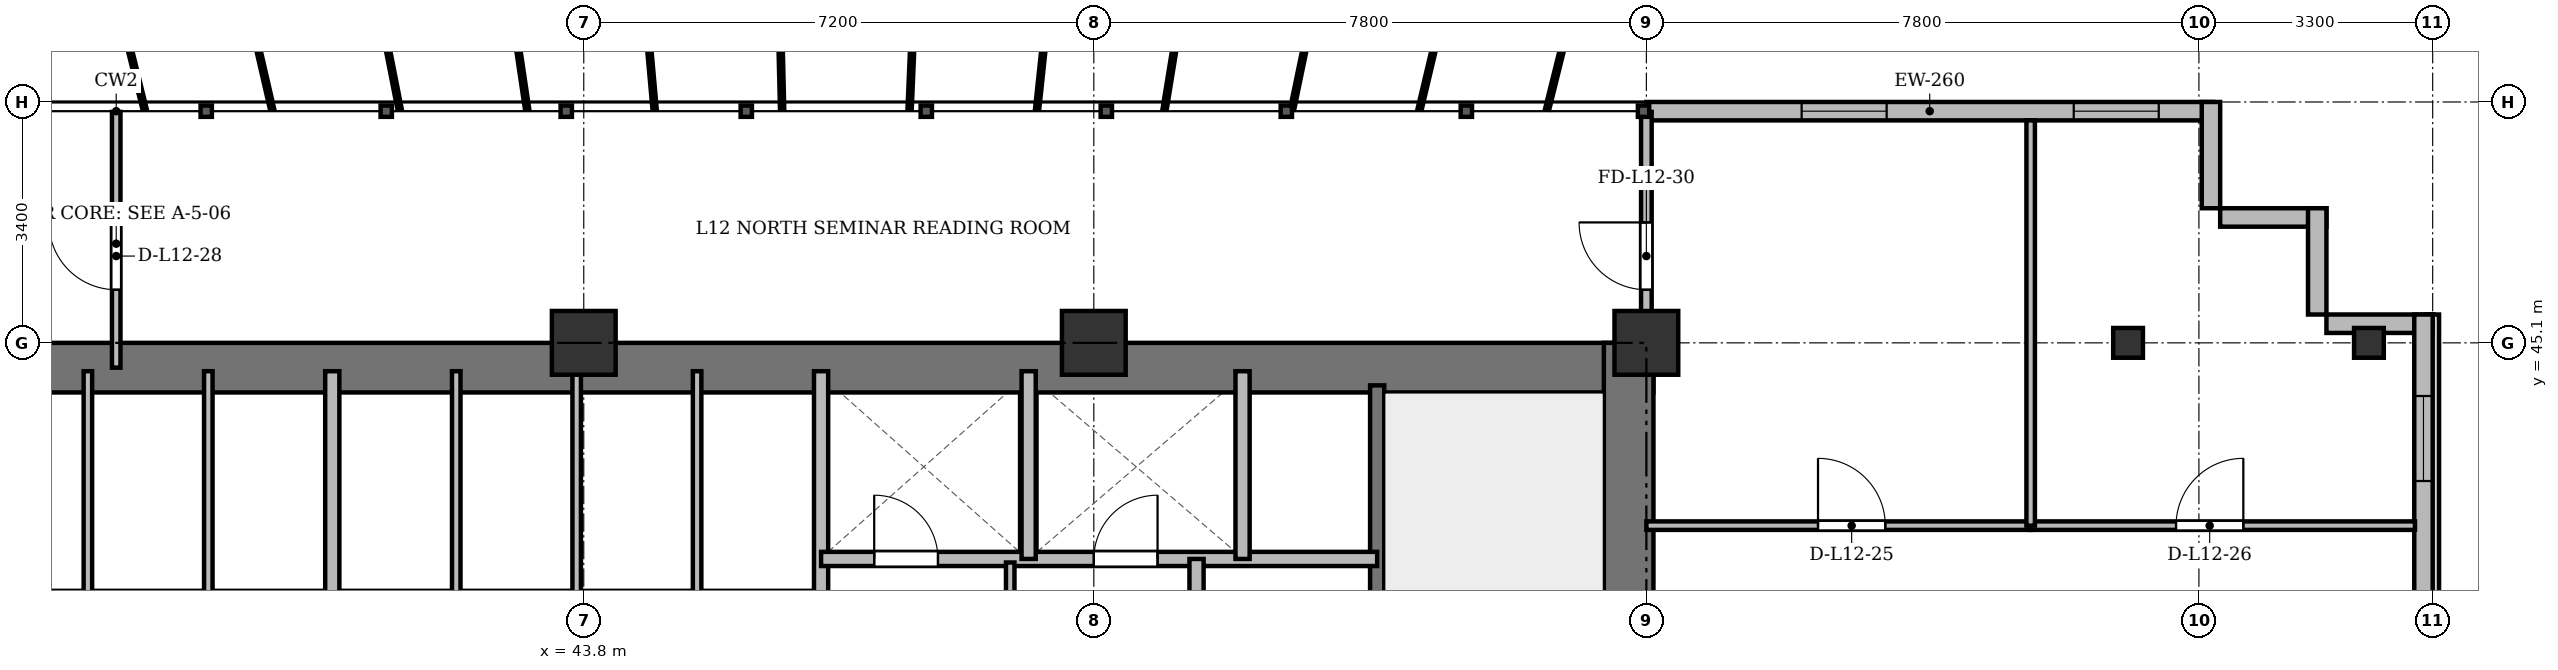
"""IFC4 building model, lengths in metres.
Left out: names, types, materials, properties, quantities, classifications, styles, units other than length and angle.
Written with IfcOpenShell. Run it as: python <this file> out.ifc"""

import sys

from ifc_helpers import new_model, si_unit, direction, frame, frame_2d, origin, origin_2d, place, context, subcontext, project, spatial, rectangle, i_section, extrude, source, transform, mapped, element, fill, save


model = new_model("IFC4")
c1 = context("Model", 3, precision=1e-05, world=origin(), true_north=direction((0.0, 1.0)))
c2 = subcontext(c1, "Body", "Model", "MODEL_VIEW")
j1 = project(units=[si_unit("LENGTHUNIT", "METRE"), si_unit("PLANEANGLEUNIT", "RADIAN")], contexts=[c1])
p1 = place(None, origin())
s1 = spatial("IfcSite", under=j1, at=p1, CompositionType="ELEMENT")
p2 = place(p1, origin())
s2 = spatial("IfcBuilding", under=s1, at=p2, CompositionType="ELEMENT")
p3 = place(p2, frame((0.0, 0.0, 48.7)))
s3 = spatial("IfcBuildingStorey", under=s2, at=p3, CompositionType="ELEMENT", Elevation=48.7)
m1 = source(origin(), c2, "Body", "SweptSolid", [
    extrude(rectangle(XDim=0.9, YDim=0.9, at=origin_2d()), origin(), (0.0, 0.0, 1.0), 3.6),
])
for number, where, z_axis, x_axis in (
    (1, (43.8, 45.1, 0.0), (0.0, 0.0, 1.0), (1.0, 0.0, 0.0)),
    (2, (51.0, 45.1, 0.0), (0.0, 0.0, 1.0), (1.0, 0.0, 0.0)),
    (3, (58.8, 45.1, 0.0), (0.0, 0.0, 1.0), (1.0, 0.0, 0.0)),
):
    element("IfcColumn", number, at=place(p3, frame(where, z_axis=z_axis, x_axis=x_axis)), inside=s3, PredefinedType="COLUMN", context=c2, shape_type="MappedRepresentation", body=[
        mapped(m1, transform((0.0, 0.0, 0.0), x_axis=(1.0, 0.0, 0.0), y_axis=(0.0, 1.0, 0.0), z_axis=(0.0, 0.0, 1.0), scale=1.0)),
    ])
m2 = source(origin(), c2, "Body", "SweptSolid", [
    extrude(i_section(OverallWidth=0.42, OverallDepth=0.42, WebThickness=0.026, FlangeThickness=0.04, at=origin_2d()), origin(), (0.0, 0.0, 1.0), 3.6),
])
for number, where, z_axis, x_axis in (
    (4, (65.6, 45.1, 0.0), (0.0, 0.0, 1.0), (1.0, 0.0, 0.0)),
    (5, (69.0, 45.1, 0.0), (0.0, 0.0, 1.0), (1.0, 0.0, 0.0)),
):
    element("IfcColumn", number, at=place(p3, frame(where, z_axis=z_axis, x_axis=x_axis)), inside=s3, PredefinedType="COLUMN", context=c2, shape_type="MappedRepresentation", body=[
        mapped(m2, transform((0.0, 0.0, 0.0), x_axis=(1.0, 0.0, 0.0), y_axis=(0.0, 1.0, 0.0), z_axis=(0.0, 0.0, 1.0), scale=1.0)),
    ])
p4 = place(p3, frame((58.8, 48.37, 0.0), z_axis=(0.0, 0.0, 1.0), x_axis=(1.0, 0.0, 0.0)))
e6 = element("IfcWall", 6, at=p4, inside=s3, PredefinedType="SOLIDWALL", context=c2, shape_type="SweptSolid", body=[
    extrude(rectangle(XDim=8.0, YDim=0.26, at=frame_2d((4.0, 0.0))), origin(), (0.0, 0.0, 1.0), 3.34),
])
p5 = place(p4, frame((2.192, 0.0, 0.9)))
e7 = element("IfcOpeningElement", 7, at=p5, cuts=e6, PredefinedType="OPENING", context=c2, shape_type="SweptSolid", body=[
    extrude(rectangle(XDim=1.2, YDim=1.65, at=frame_2d((0.6, 0.825))), frame((0.0, 0.14, 0.0), z_axis=(0.0, -1.0, 0.0), x_axis=(1.0, 0.0, 0.0)), (0.0, 0.0, 1.0), 0.28),
])
p6 = place(p4, frame((6.033, 0.0, 0.9)))
e8 = element("IfcOpeningElement", 8, at=p6, cuts=e6, PredefinedType="OPENING", context=c2, shape_type="SweptSolid", body=[
    extrude(rectangle(XDim=1.2, YDim=1.65, at=frame_2d((0.6, 0.825))), frame((0.0, 0.14, 0.0), z_axis=(0.0, -1.0, 0.0), x_axis=(1.0, 0.0, 0.0)), (0.0, 0.0, 1.0), 0.28),
])
for number, where, z_axis, x_axis in (
    (9, (66.77, 48.5, 0.0), (0.0, 0.0, 1.0), (0.0, -1.0, 0.0)),
    (10, (66.9, 46.87, 0.0), (0.0, 0.0, 1.0), (1.0, 0.0, 0.0)),
    (11, (68.27, 47.0, 0.0), (0.0, 0.0, 1.0), (0.0, -1.0, 0.0)),
):
    element("IfcWall", number, at=place(p3, frame(where, z_axis=z_axis, x_axis=x_axis)), inside=s3, PredefinedType="SOLIDWALL", context=c2, shape_type="SweptSolid", body=[
        extrude(rectangle(XDim=1.5, YDim=0.26, at=frame_2d((0.75, 0.0))), origin(), (0.0, 0.0, 1.0), 3.34),
    ])
p7 = place(p3, frame((68.4, 45.37, 0.0), z_axis=(0.0, 0.0, 1.0), x_axis=(1.0, 0.0, 0.0)))
e12 = element("IfcWall", 12, at=p7, inside=s3, PredefinedType="SOLIDWALL", context=c2, shape_type="SweptSolid", body=[
    extrude(rectangle(XDim=1.5, YDim=0.26, at=frame_2d((0.75, 0.0))), origin(), (0.0, 0.0, 1.0), 2.69),
])
p8 = place(p3, frame((69.77, 45.5, 0.0), z_axis=(0.0, 0.0, 1.0), x_axis=(0.0, -1.0, 0.0)))
e13 = element("IfcWall", 13, at=p8, inside=s3, PredefinedType="SOLIDWALL", context=c2, shape_type="SweptSolid", body=[
    extrude(rectangle(XDim=39.6, YDim=0.26, at=frame_2d((19.8, 0.0))), origin(), (0.0, 0.0, 1.0), 3.34),
])
p9 = place(p8, frame((36.95, 0.0, 0.92)))
e14 = element("IfcOpeningElement", 14, at=p9, cuts=e13, PredefinedType="OPENING", context=c2, shape_type="SweptSolid", body=[
    extrude(rectangle(XDim=1.2, YDim=1.65, at=frame_2d((0.6, 0.825))), frame((0.0, 0.14, 0.0), z_axis=(0.0, -1.0, 0.0), x_axis=(1.0, 0.0, 0.0)), (0.0, 0.0, 1.0), 0.28),
])
p10 = place(p8, frame((32.8, 0.0, 0.92)))
e15 = element("IfcOpeningElement", 15, at=p10, cuts=e13, PredefinedType="OPENING", context=c2, shape_type="SweptSolid", body=[
    extrude(rectangle(XDim=2.6, YDim=1.9, at=frame_2d((1.3, 0.95))), frame((0.0, 0.14, 0.0), z_axis=(0.0, -1.0, 0.0), x_axis=(1.0, 0.0, 0.0)), (0.0, 0.0, 1.0), 0.28),
])
p11 = place(p8, frame((28.6, 0.0, 0.92)))
e16 = element("IfcOpeningElement", 16, at=p11, cuts=e13, PredefinedType="OPENING", context=c2, shape_type="SweptSolid", body=[
    extrude(rectangle(XDim=2.6, YDim=1.9, at=frame_2d((1.3, 0.95))), frame((0.0, 0.14, 0.0), z_axis=(0.0, -1.0, 0.0), x_axis=(1.0, 0.0, 0.0)), (0.0, 0.0, 1.0), 0.28),
])
p12 = place(p8, frame((21.4, 0.0, 0.92)))
e17 = element("IfcOpeningElement", 17, at=p12, cuts=e13, PredefinedType="OPENING", context=c2, shape_type="SweptSolid", body=[
    extrude(rectangle(XDim=2.6, YDim=1.9, at=frame_2d((1.3, 0.95))), frame((0.0, 0.14, 0.0), z_axis=(0.0, -1.0, 0.0), x_axis=(1.0, 0.0, 0.0)), (0.0, 0.0, 1.0), 0.28),
])
p13 = place(p8, frame((7.4, 0.0, 0.92)))
e18 = element("IfcOpeningElement", 18, at=p13, cuts=e13, PredefinedType="OPENING", context=c2, shape_type="SweptSolid", body=[
    extrude(rectangle(XDim=2.6, YDim=1.9, at=frame_2d((1.3, 0.95))), frame((0.0, 0.14, 0.0), z_axis=(0.0, -1.0, 0.0), x_axis=(1.0, 0.0, 0.0)), (0.0, 0.0, 1.0), 0.28),
])
p14 = place(p8, frame((4.5, 0.0, 0.92)))
e19 = element("IfcOpeningElement", 19, at=p14, cuts=e13, PredefinedType="OPENING", context=c2, shape_type="SweptSolid", body=[
    extrude(rectangle(XDim=1.2, YDim=1.65, at=frame_2d((0.6, 0.825))), frame((0.0, 0.14, 0.0), z_axis=(0.0, -1.0, 0.0), x_axis=(1.0, 0.0, 0.0)), (0.0, 0.0, 1.0), 0.28),
])
p15 = place(p8, frame((1.15, 0.0, 0.92)))
e20 = element("IfcOpeningElement", 20, at=p15, cuts=e13, PredefinedType="OPENING", context=c2, shape_type="SweptSolid", body=[
    extrude(rectangle(XDim=1.2, YDim=1.65, at=frame_2d((0.6, 0.825))), frame((0.0, 0.14, 0.0), z_axis=(0.0, -1.0, 0.0), x_axis=(1.0, 0.0, 0.0)), (0.0, 0.0, 1.0), 0.28),
])
p16 = place(p3, frame((15.5, 44.75, 0.0), z_axis=(0.0, 0.0, 1.0), x_axis=(1.0, 0.0, 0.0)))
e21 = element("IfcWall", 21, at=p16, inside=s3, PredefinedType="SHEAR", context=c2, shape_type="SweptSolid", body=[
    extrude(rectangle(XDim=43.4, YDim=0.7, at=frame_2d((21.7, 0.0))), origin(), (0.0, 0.0, 1.0), 3.34),
])
p17 = place(p3, frame((58.55, 33.4, 0.0), z_axis=(0.0, 0.0, 1.0), x_axis=(0.0, 1.0, 0.0)))
e22 = element("IfcWall", 22, at=p17, inside=s3, PredefinedType="SHEAR", context=c2, shape_type="SweptSolid", body=[
    extrude(rectangle(XDim=11.7, YDim=0.7, at=frame_2d((5.85, 0.0))), origin(), (0.0, 0.0, 1.0), 3.34),
])
p18 = place(p3, frame((55.0, 33.4, 0.0), z_axis=(0.0, 0.0, 1.0), x_axis=(0.0, 1.0, 0.0)))
e23 = element("IfcWall", 23, at=p18, inside=s3, PredefinedType="SHEAR", context=c2, shape_type="SweptSolid", body=[
    extrude(rectangle(XDim=11.1, YDim=0.2, at=frame_2d((5.55, 0.0))), origin(), (0.0, 0.0, 1.0), 3.34),
])
p19 = place(p18, frame((0.85, 0.0, 0.0)))
e24 = element("IfcOpeningElement", 24, at=p19, cuts=e23, PredefinedType="OPENING", context=c2, shape_type="SweptSolid", body=[
    extrude(rectangle(XDim=1.1, YDim=2.15, at=frame_2d((0.55, 1.075))), frame((0.0, 0.11, 0.0), z_axis=(0.0, -1.0, 0.0), x_axis=(1.0, 0.0, 0.0)), (0.0, 0.0, 1.0), 0.22),
])
for number, where, z_axis, x_axis in (
    (25, (36.8, 41.5, 0.0), (0.0, 0.0, 1.0), (0.0, 1.0, 0.0)),
    (26, (38.5, 41.5, 0.0), (0.0, 0.0, 1.0), (0.0, 1.0, 0.0)),
):
    element("IfcWall", number, at=place(p3, frame(where, z_axis=z_axis, x_axis=x_axis)), inside=s3, PredefinedType="PARTITIONING", context=c2, shape_type="SweptSolid", body=[
        extrude(rectangle(XDim=3.2, YDim=0.12, at=frame_2d((1.6, 0.0))), origin(), (0.0, 0.0, 1.0), 3.34),
    ])
p20 = place(p3, frame((40.25, 41.5, 0.0), z_axis=(0.0, 0.0, 1.0), x_axis=(0.0, 1.0, 0.0)))
e27 = element("IfcWall", 27, at=p20, inside=s3, PredefinedType="SOLIDWALL", context=c2, shape_type="SweptSolid", body=[
    extrude(rectangle(XDim=3.2, YDim=0.2, at=frame_2d((1.6, 0.0))), origin(), (0.0, 0.0, 1.0), 3.34),
])
p21 = place(p3, frame((42.0, 41.5, 0.0), z_axis=(0.0, 0.0, 1.0), x_axis=(0.0, 1.0, 0.0)))
e28 = element("IfcWall", 28, at=p21, inside=s3, PredefinedType="PARTITIONING", context=c2, shape_type="SweptSolid", body=[
    extrude(rectangle(XDim=3.2, YDim=0.12, at=frame_2d((1.6, 0.0))), origin(), (0.0, 0.0, 1.0), 3.34),
])
p22 = place(p3, frame((43.7, 41.5, 0.0), z_axis=(0.0, 0.0, 1.0), x_axis=(0.0, 1.0, 0.0)))
e29 = element("IfcWall", 29, at=p22, inside=s3, PredefinedType="PARTITIONING", context=c2, shape_type="SweptSolid", body=[
    extrude(rectangle(XDim=3.2, YDim=0.12, at=frame_2d((1.6, 0.0))), origin(), (0.0, 0.0, 1.0), 2.752),
])
p23 = place(p3, frame((45.4, 41.5, 0.0), z_axis=(0.0, 0.0, 1.0), x_axis=(0.0, 1.0, 0.0)))
e30 = element("IfcWall", 30, at=p23, inside=s3, PredefinedType="PARTITIONING", context=c2, shape_type="SweptSolid", body=[
    extrude(rectangle(XDim=3.2, YDim=0.12, at=frame_2d((1.6, 0.0))), origin(), (0.0, 0.0, 1.0), 3.34),
])
p24 = place(p3, frame((47.15, 33.4, 0.0), z_axis=(0.0, 0.0, 1.0), x_axis=(0.0, 1.0, 0.0)))
e31 = element("IfcWall", 31, at=p24, inside=s3, PredefinedType="SOLIDWALL", context=c2, shape_type="SweptSolid", body=[
    extrude(rectangle(XDim=11.3, YDim=0.2, at=frame_2d((5.65, 0.0))), origin(), (0.0, 0.0, 1.0), 2.69),
])
p25 = place(p3, frame((47.15, 42.05, 0.0), z_axis=(0.0, 0.0, 1.0), x_axis=(1.0, 0.0, 0.0)))
e32 = element("IfcWall", 32, at=p25, inside=s3, PredefinedType="SOLIDWALL", context=c2, shape_type="SweptSolid", body=[
    extrude(rectangle(XDim=7.85, YDim=0.2, at=frame_2d((3.925, 0.0))), origin(), (0.0, 0.0, 1.0), 2.752),
])
p26 = place(p25, frame((0.75, 0.0, 0.0)))
e33 = element("IfcOpeningElement", 33, at=p26, cuts=e32, PredefinedType="OPENING", context=c2, shape_type="SweptSolid", body=[
    extrude(rectangle(XDim=0.9, YDim=2.1, at=frame_2d((0.45, 1.05))), frame((0.0, 0.11, 0.0), z_axis=(0.0, -1.0, 0.0), x_axis=(1.0, 0.0, 0.0)), (0.0, 0.0, 1.0), 0.22),
])
p27 = place(p25, frame((3.85, 0.0, 0.0)))
e34 = element("IfcOpeningElement", 34, at=p27, cuts=e32, PredefinedType="OPENING", context=c2, shape_type="SweptSolid", body=[
    extrude(rectangle(XDim=0.9, YDim=2.1, at=frame_2d((0.45, 1.05))), frame((0.0, 0.11, 0.0), z_axis=(0.0, -1.0, 0.0), x_axis=(1.0, 0.0, 0.0)), (0.0, 0.0, 1.0), 0.22),
])
for number, where, z_axis, x_axis in (
    (35, (50.08, 42.05, 0.0), (0.0, 0.0, 1.0), (0.0, 1.0, 0.0)),
    (36, (53.1, 42.05, 0.0), (0.0, 0.0, 1.0), (0.0, 1.0, 0.0)),
):
    element("IfcWall", number, at=place(p3, frame(where, z_axis=z_axis, x_axis=x_axis)), inside=s3, PredefinedType="SOLIDWALL", context=c2, shape_type="SweptSolid", body=[
        extrude(rectangle(XDim=2.65, YDim=0.2, at=frame_2d((1.325, 0.0))), origin(), (0.0, 0.0, 1.0), 3.34),
    ])
p28 = place(p3, frame((52.45, 33.4, 0.0), z_axis=(0.0, 0.0, 1.0), x_axis=(0.0, 1.0, 0.0)))
e37 = element("IfcWall", 37, at=p28, inside=s3, PredefinedType="PARTITIONING", context=c2, shape_type="SweptSolid", body=[
    extrude(rectangle(XDim=8.65, YDim=0.2, at=frame_2d((4.325, 0.0))), origin(), (0.0, 0.0, 1.0), 2.69),
])
p29 = place(p28, frame((6.2, 0.0, 0.0)))
e38 = element("IfcOpeningElement", 38, at=p29, cuts=e37, PredefinedType="OPENING", context=c2, shape_type="SweptSolid", body=[
    extrude(rectangle(XDim=0.95, YDim=2.15, at=frame_2d((0.475, 1.075))), frame((0.0, 0.11, 0.0), z_axis=(0.0, -1.0, 0.0), x_axis=(1.0, 0.0, 0.0)), (0.0, 0.0, 1.0), 0.22),
])
p30 = place(p3, frame((49.82, 36.18, 0.0), z_axis=(0.0, 0.0, 1.0), x_axis=(0.0, 1.0, 0.0)))
e39 = element("IfcWall", 39, at=p30, inside=s3, PredefinedType="PARTITIONING", context=c2, shape_type="SweptSolid", body=[
    extrude(rectangle(XDim=5.82, YDim=0.12, at=frame_2d((2.91, 0.0))), origin(), (0.0, 0.0, 1.0), 3.34),
])
p31 = place(p3, frame((58.8, 42.52, 0.0), z_axis=(0.0, 0.0, 1.0), x_axis=(1.0, 0.0, 0.0)))
e40 = element("IfcWall", 40, at=p31, inside=s3, PredefinedType="PARTITIONING", context=c2, shape_type="SweptSolid", body=[
    extrude(rectangle(XDim=5.425, YDim=0.12, at=frame_2d((2.712, 0.0))), origin(), (0.0, 0.0, 1.0), 2.752),
])
p32 = place(p31, frame((2.423, 0.0, 0.0)))
e41 = element("IfcOpeningElement", 41, at=p32, cuts=e40, PredefinedType="OPENING", context=c2, shape_type="SweptSolid", body=[
    extrude(rectangle(XDim=0.95, YDim=2.15, at=frame_2d((0.475, 1.075))), frame((0.0, 0.07, 0.0), z_axis=(0.0, -1.0, 0.0), x_axis=(1.0, 0.0, 0.0)), (0.0, 0.0, 1.0), 0.14),
])
p33 = place(p3, frame((64.225, 42.52, 0.0), z_axis=(0.0, 0.0, 1.0), x_axis=(1.0, 0.0, 0.0)))
e42 = element("IfcWall", 42, at=p33, inside=s3, PredefinedType="PARTITIONING", context=c2, shape_type="SweptSolid", body=[
    extrude(rectangle(XDim=5.425, YDim=0.12, at=frame_2d((2.712, 0.0))), origin(), (0.0, 0.0, 1.0), 2.752),
])
p34 = place(p33, frame((2.052, 0.0, 0.0)))
e43 = element("IfcOpeningElement", 43, at=p34, cuts=e42, PredefinedType="OPENING", context=c2, shape_type="SweptSolid", body=[
    extrude(rectangle(XDim=0.95, YDim=2.15, at=frame_2d((0.475, 1.075))), frame((0.0, 0.07, 0.0), z_axis=(0.0, -1.0, 0.0), x_axis=(1.0, 0.0, 0.0)), (0.0, 0.0, 1.0), 0.14),
])
p35 = place(p3, frame((64.225, 42.52, 0.0), z_axis=(0.0, 0.0, 1.0), x_axis=(0.0, 1.0, 0.0)))
e44 = element("IfcWall", 44, at=p35, inside=s3, PredefinedType="PARTITIONING", context=c2, shape_type="SweptSolid", body=[
    extrude(rectangle(XDim=5.72, YDim=0.12, at=frame_2d((2.86, 0.0))), origin(), (0.0, 0.0, 1.0), 2.69),
])
p36 = place(p3, frame((37.2, 44.75, 0.0), z_axis=(0.0, 0.0, 1.0), x_axis=(0.0, 1.0, 0.0)))
e45 = element("IfcWall", 45, at=p36, inside=s3, PredefinedType="PARTITIONING", context=c2, shape_type="SweptSolid", body=[
    extrude(rectangle(XDim=3.61, YDim=0.12, at=frame_2d((1.805, 0.0))), origin(), (0.0, 0.0, 1.0), 2.69),
])
p37 = place(p36, frame((1.1, 0.0, 0.0)))
e46 = element("IfcOpeningElement", 46, at=p37, cuts=e45, PredefinedType="OPENING", context=c2, shape_type="SweptSolid", body=[
    extrude(rectangle(XDim=0.95, YDim=2.15, at=frame_2d((0.475, 1.075))), frame((0.0, 0.07, 0.0), z_axis=(0.0, -1.0, 0.0), x_axis=(1.0, 0.0, 0.0)), (0.0, 0.0, 1.0), 0.14),
])
p38 = place(p3, frame((58.8, 44.75, 0.0), z_axis=(0.0, 0.0, 1.0), x_axis=(0.0, 1.0, 0.0)))
e47 = element("IfcWall", 47, at=p38, inside=s3, PredefinedType="PARTITIONING", context=c2, shape_type="SweptSolid", body=[
    extrude(rectangle(XDim=3.61, YDim=0.15, at=frame_2d((1.805, 0.0))), origin(), (0.0, 0.0, 1.0), 2.752),
])
p39 = place(p38, frame((1.1, 0.0, 0.0)))
e48 = element("IfcOpeningElement", 48, at=p39, cuts=e47, PredefinedType="OPENING", context=c2, shape_type="SweptSolid", body=[
    extrude(rectangle(XDim=0.95, YDim=2.15, at=frame_2d((0.475, 1.075))), frame((0.0, 0.085, 0.0), z_axis=(0.0, -1.0, 0.0), x_axis=(1.0, 0.0, 0.0)), (0.0, 0.0, 1.0), 0.17),
])
m3 = source(origin(), c2, "Body", "SweptSolid", [
    extrude(rectangle(XDim=1.2, YDim=1.65, at=frame_2d((0.6, 0.825))), frame((0.0, 0.03, 0.0), z_axis=(0.0, -1.0, 0.0), x_axis=(1.0, 0.0, 0.0)), (0.0, 0.0, 1.0), 0.06),
])
p40 = place(p5, origin())
e49 = element("IfcWindow", 49, at=p40, inside=s3, PartitioningType="SINGLE_PANEL", PredefinedType="WINDOW", context=c2, shape_type="MappedRepresentation", body=[
    mapped(m3, transform((0.0, 0.0, 0.0), x_axis=(1.0, 0.0, 0.0), y_axis=(0.0, 1.0, 0.0), z_axis=(0.0, 0.0, 1.0), scale=1.0)),
])
fill(e7, e49)
p41 = place(p6, origin())
e50 = element("IfcWindow", 50, at=p41, inside=s3, PartitioningType="SINGLE_PANEL", PredefinedType="WINDOW", context=c2, shape_type="MappedRepresentation", body=[
    mapped(m3, transform((0.0, 0.0, 0.0), x_axis=(1.0, 0.0, 0.0), y_axis=(0.0, 1.0, 0.0), z_axis=(0.0, 0.0, 1.0), scale=1.0)),
])
fill(e8, e50)
p42 = place(p15, origin())
e51 = element("IfcWindow", 51, at=p42, inside=s3, PartitioningType="SINGLE_PANEL", PredefinedType="WINDOW", context=c2, shape_type="MappedRepresentation", body=[
    mapped(m3, transform((0.0, 0.0, 0.0), x_axis=(1.0, 0.0, 0.0), y_axis=(0.0, 1.0, 0.0), z_axis=(0.0, 0.0, 1.0), scale=1.0)),
])
fill(e20, e51)
m4 = source(origin(), c2, "Body", "SweptSolid", [
    extrude(rectangle(XDim=0.9, YDim=2.1, at=frame_2d((0.45, 1.05))), frame((0.0, 0.025, 0.0), z_axis=(0.0, -1.0, 0.0), x_axis=(1.0, 0.0, 0.0)), (0.0, 0.0, 1.0), 0.05),
])
p43 = place(p26, origin())
e52 = element("IfcDoor", 52, at=p43, inside=s3, OperationType="SINGLE_SWING_LEFT", PredefinedType="DOOR", context=c2, shape_type="MappedRepresentation", body=[
    mapped(m4, transform((0.0, 0.0, 0.0), x_axis=(1.0, 0.0, 0.0), y_axis=(0.0, 1.0, 0.0), z_axis=(0.0, 0.0, 1.0), scale=1.0)),
])
fill(e33, e52)
p44 = place(p27, origin())
e53 = element("IfcDoor", 53, at=p44, inside=s3, OperationType="SINGLE_SWING_RIGHT", PredefinedType="DOOR", context=c2, shape_type="MappedRepresentation", body=[
    mapped(m4, transform((0.0, 0.0, 0.0), x_axis=(1.0, 0.0, 0.0), y_axis=(0.0, 1.0, 0.0), z_axis=(0.0, 0.0, 1.0), scale=1.0)),
])
fill(e34, e53)
m5 = source(origin(), c2, "Body", "SweptSolid", [
    extrude(rectangle(XDim=0.95, YDim=2.15, at=frame_2d((0.475, 1.075))), frame((0.0, 0.025, 0.0), z_axis=(0.0, -1.0, 0.0), x_axis=(1.0, 0.0, 0.0)), (0.0, 0.0, 1.0), 0.05),
])
p45 = place(p32, origin())
e54 = element("IfcDoor", 54, at=p45, inside=s3, OperationType="SINGLE_SWING_LEFT", PredefinedType="DOOR", context=c2, shape_type="MappedRepresentation", body=[
    mapped(m5, transform((0.0, 0.0, 0.0), x_axis=(1.0, 0.0, 0.0), y_axis=(0.0, 1.0, 0.0), z_axis=(0.0, 0.0, 1.0), scale=1.0)),
])
fill(e41, e54)
p46 = place(p34, origin())
e55 = element("IfcDoor", 55, at=p46, inside=s3, OperationType="SINGLE_SWING_RIGHT", PredefinedType="DOOR", context=c2, shape_type="MappedRepresentation", body=[
    mapped(m5, transform((0.0, 0.0, 0.0), x_axis=(1.0, 0.0, 0.0), y_axis=(0.0, 1.0, 0.0), z_axis=(0.0, 0.0, 1.0), scale=1.0)),
])
fill(e43, e55)
p47 = place(p37, origin())
e56 = element("IfcDoor", 56, at=p47, inside=s3, OperationType="SINGLE_SWING_RIGHT", PredefinedType="DOOR", context=c2, shape_type="MappedRepresentation", body=[
    mapped(m5, transform((0.0, 0.0, 0.0), x_axis=(1.0, 0.0, 0.0), y_axis=(0.0, 1.0, 0.0), z_axis=(0.0, 0.0, 1.0), scale=1.0)),
])
fill(e46, e56)
p48 = place(p39, origin())
e57 = element("IfcDoor", 57, at=p48, inside=s3, OperationType="SINGLE_SWING_RIGHT", PredefinedType="DOOR", context=c2, shape_type="MappedRepresentation", body=[
    mapped(m5, transform((0.0, 0.0, 0.0), x_axis=(1.0, 0.0, 0.0), y_axis=(0.0, 1.0, 0.0), z_axis=(0.0, 0.0, 1.0), scale=1.0)),
])
fill(e48, e57)
save(model, sys.argv[1])
